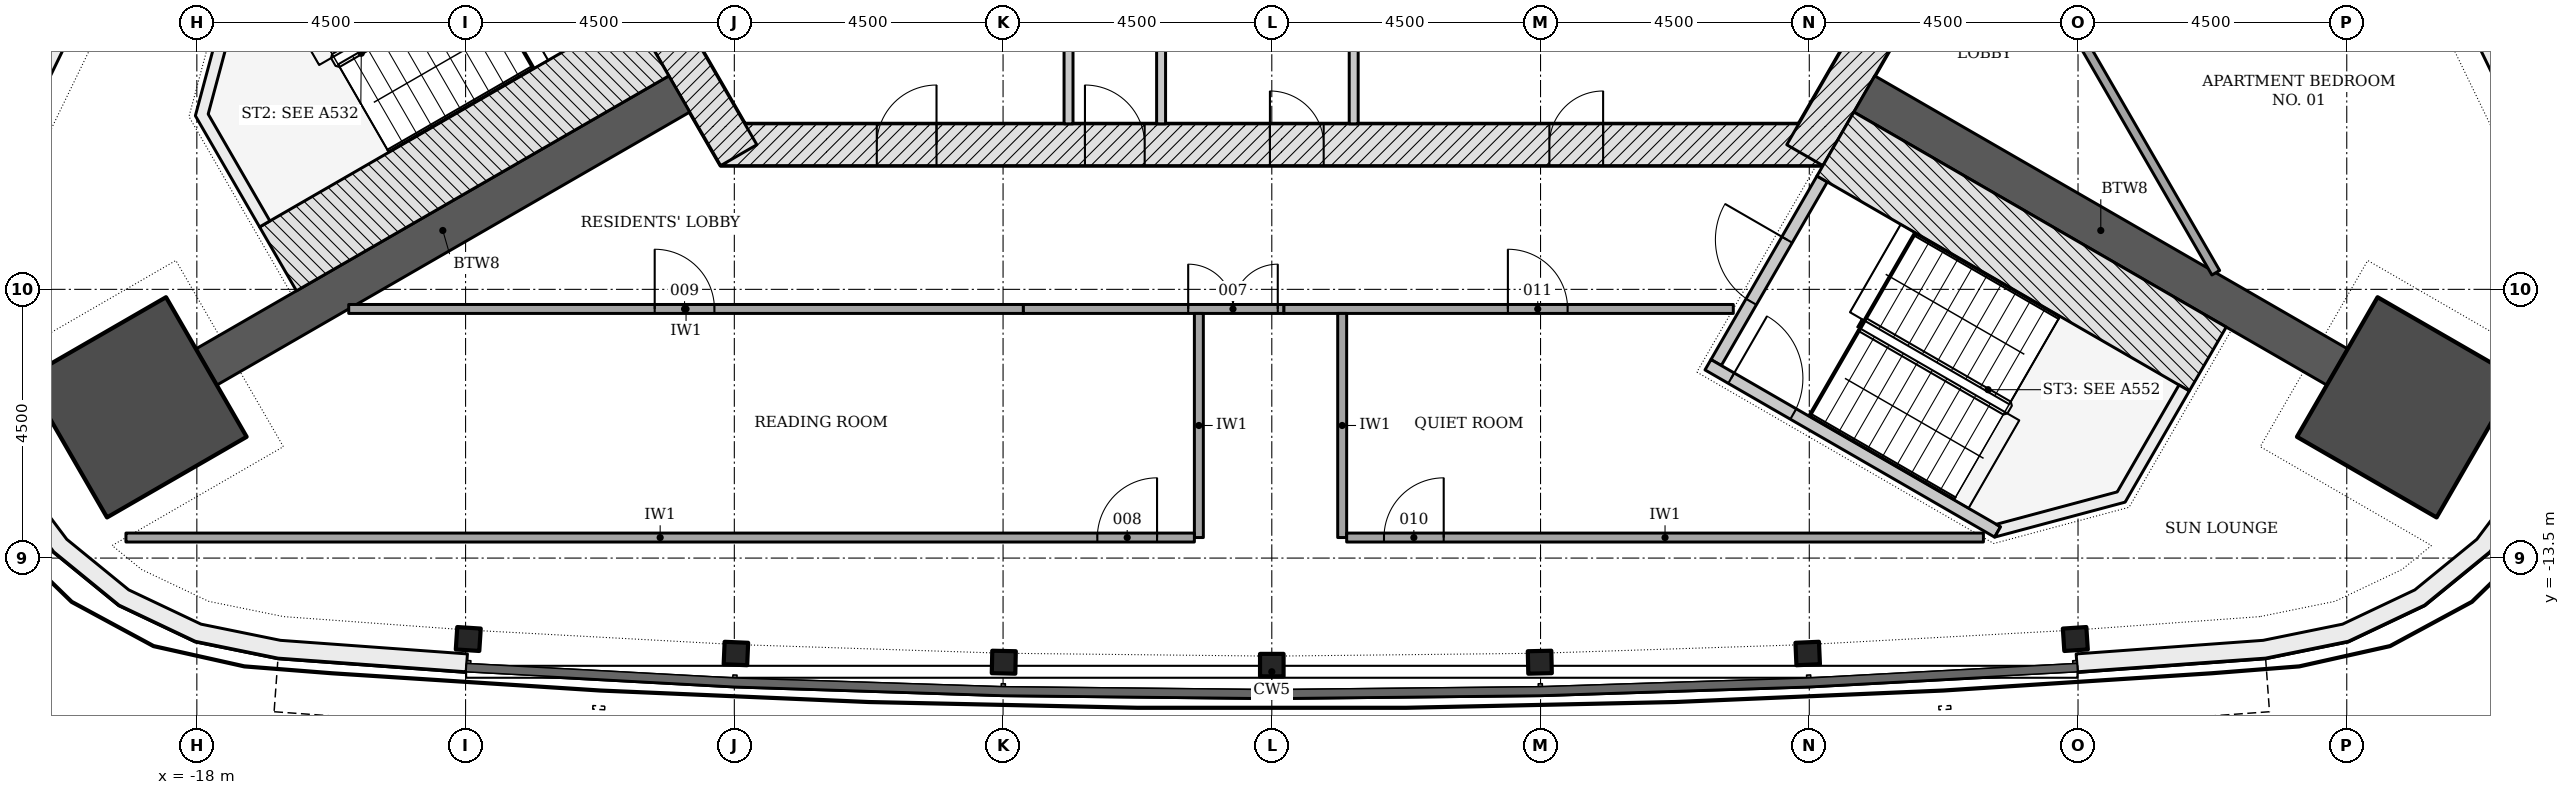
"""IFC4 building model, lengths in metres.
Left out: names, types, materials, properties, quantities, classifications, styles, units other than length and angle.
Written with IfcOpenShell. Run it as: python <this file> out.ifc"""

import sys

from ifc_helpers import new_model, si_unit, direction, frame, frame_2d, origin, origin_2d, place, context, subcontext, project, spatial, polyline, rectangle, i_section, outline, extrude, element, fill, save


model = new_model("IFC4")
c1 = context("Model", 3, precision=1e-05, world=origin(), true_north=direction((0.0, 1.0)))
c2 = subcontext(c1, "Body", "Model", "MODEL_VIEW")
j1 = project(units=[si_unit("LENGTHUNIT", "METRE"), si_unit("PLANEANGLEUNIT", "RADIAN")], contexts=[c1])
p1 = place(None, origin())
s1 = spatial("IfcSite", under=j1, at=p1, CompositionType="ELEMENT")
p2 = place(p1, origin())
s2 = spatial("IfcBuilding", under=s1, at=p2, CompositionType="ELEMENT")
p3 = place(p2, frame((0.0, 0.0, 192.3)))
s3 = spatial("IfcBuildingStorey", under=s2, at=p3, CompositionType="ELEMENT", Elevation=192.3)
p4 = place(p3, frame((-9.229, -6.578, -0.2), z_axis=(0.0, 0.0, 1.0), x_axis=(1.0, 0.0, 0.0)))
e1 = element("IfcWall", 1, at=p4, inside=s3, PredefinedType="SHEAR", context=c2, shape_type="SweptSolid", body=[
    extrude(rectangle(XDim=18.458, YDim=0.7, at=frame_2d((9.229, 0.0))), origin(), (0.0, 0.0, 1.0), 3.6),
])
p5 = place(p4, frame((6.1, 0.0, 0.2)))
e2 = element("IfcOpeningElement", 2, at=p5, cuts=e1, PredefinedType="OPENING", context=c2, shape_type="SweptSolid", body=[
    extrude(rectangle(XDim=1.0, YDim=2.1, at=frame_2d((0.5, 1.05))), frame((0.0, 0.36, 0.0), z_axis=(0.0, -1.0, 0.0), x_axis=(1.0, 0.0, 0.0)), (0.0, 0.0, 1.0), 0.72),
])
p6 = place(p4, frame((2.615, 0.0, 0.2)))
e3 = element("IfcOpeningElement", 3, at=p6, cuts=e1, PredefinedType="OPENING", context=c2, shape_type="SweptSolid", body=[
    extrude(rectangle(XDim=1.0, YDim=2.1, at=frame_2d((0.5, 1.05))), frame((0.0, 0.36, 0.0), z_axis=(0.0, -1.0, 0.0), x_axis=(1.0, 0.0, 0.0)), (0.0, 0.0, 1.0), 0.72),
])
p7 = place(p4, frame((9.198, 0.0, 0.2)))
e4 = element("IfcOpeningElement", 4, at=p7, cuts=e1, PredefinedType="OPENING", context=c2, shape_type="SweptSolid", body=[
    extrude(rectangle(XDim=0.9, YDim=2.1, at=frame_2d((0.45, 1.05))), frame((0.0, 0.36, 0.0), z_axis=(0.0, -1.0, 0.0), x_axis=(1.0, 0.0, 0.0)), (0.0, 0.0, 1.0), 0.72),
])
p8 = place(p4, frame((13.877, 0.0, 0.2)))
e5 = element("IfcOpeningElement", 5, at=p8, cuts=e1, PredefinedType="OPENING", context=c2, shape_type="SweptSolid", body=[
    extrude(rectangle(XDim=0.9, YDim=2.1, at=frame_2d((0.45, 1.05))), frame((0.0, 0.36, 0.0), z_axis=(0.0, -1.0, 0.0), x_axis=(1.0, 0.0, 0.0)), (0.0, 0.0, 1.0), 0.72),
])
for number, where, z_axis, x_axis in (
    (6, (8.926, -6.753, -0.2), (0.0, 0.0, 1.0), (0.5, 0.866, 0.0)),
    (7, (-10.311, -4.353, -0.2), (0.0, 0.0, 1.0), (0.5, -0.866, 0.0)),
):
    element("IfcWall", number, at=place(p3, frame(where, z_axis=z_axis, x_axis=x_axis)), inside=s3, PredefinedType="SHEAR", context=c2, shape_type="SweptSolid", body=[
        extrude(rectangle(XDim=2.771, YDim=0.7, at=frame_2d((1.386, 0.0))), origin(), (0.0, 0.0, 1.0), 3.6),
    ])
for number, where, z_axis, x_axis in (
    (8, (-9.922, -5.728, -0.2), (0.0, 0.0, 1.0), (-0.866, -0.5, 0.0)),
    (9, (9.922, -5.728, -0.2), (0.0, 0.0, 1.0), (0.866, -0.5, 0.0)),
):
    element("IfcWall", number, at=place(p3, frame(where, z_axis=z_axis, x_axis=x_axis)), inside=s3, PredefinedType="SHEAR", context=c2, shape_type="SweptSolid", body=[
        extrude(rectangle(XDim=9.145, YDim=0.7, at=frame_2d((4.572, 0.0))), origin(), (0.0, 0.0, 1.0), 3.6),
    ])
for number, where, z_axis, x_axis in (
    (10, (-19.01, -10.976, -0.2), (0.0, 0.0, 1.0), (-0.866, -0.5, 0.0)),
    (11, (19.01, -10.976, -0.2), (0.0, 0.0, 1.0), (0.866, -0.5, 0.0)),
):
    element("IfcColumn", number, at=place(p3, frame(where, z_axis=z_axis, x_axis=x_axis)), inside=s3, PredefinedType="COLUMN", context=c2, shape_type="SweptSolid", body=[
        extrude(rectangle(XDim=2.7, YDim=2.7, at=origin_2d()), origin(), (0.0, 0.0, 1.0), 3.6),
    ])
for number, where, z_axis, x_axis in (
    (12, (-13.455, -14.855, -0.2), (0.0, 0.0, 1.0), (0.998, -0.065, 0.0)),
    (13, (-8.973, -15.098, -0.2), (0.0, 0.0, 1.0), (0.999, -0.043, 0.0)),
    (14, (-4.488, -15.244, -0.2), (0.0, 0.0, 1.0), (1.0, -0.022, 0.0)),
    (15, (0.0, -15.292, -0.2), (0.0, 0.0, 1.0), (1.0, 0.0, 0.0)),
    (16, (4.488, -15.244, -0.2), (0.0, 0.0, 1.0), (1.0, 0.022, 0.0)),
    (17, (8.973, -15.098, -0.2), (0.0, 0.0, 1.0), (0.999, 0.043, 0.0)),
    (18, (13.455, -14.855, -0.2), (0.0, 0.0, 1.0), (0.998, 0.065, 0.0)),
):
    element("IfcColumn", number, at=place(p3, frame(where, z_axis=z_axis, x_axis=x_axis)), inside=s3, PredefinedType="COLUMN", context=c2, shape_type="SweptSolid", body=[
        extrude(i_section(OverallWidth=0.394, OverallDepth=0.376, WebThickness=0.017, FlangeThickness=0.028, FilletRadius=0.015, at=origin_2d()), origin(), (0.0, 0.0, 1.0), 3.6),
    ])
p9 = place(p3, origin())
e19 = element("IfcWall", 19, at=p9, inside=s3, PredefinedType="NOTDEFINED", context=c2, shape_type="SweptSolid", body=[
    extrude(outline(polyline([(-20.086, -3.981), (-21.463, -6.824), (-21.91, -8.164), (-22.025, -9.572), (-21.798, -10.966), (-21.245, -12.266), (-20.396, -13.395), (-19.302, -14.288), (-18.025, -14.893), (-16.641, -15.175), (-13.49, -15.404), (-13.469, -15.105), (-16.6, -14.877), (-17.929, -14.606), (-19.14, -14.032), (-20.178, -13.186), (-20.983, -12.115), (-21.508, -10.882), (-21.723, -9.56), (-21.615, -8.224), (-21.184, -6.937), (-19.816, -4.112), (-20.086, -3.981)])), origin(), (0.0, 0.0, 1.0), 3.3),
])
p10 = place(p3, origin())
e20 = element("IfcWall", 20, at=p10, inside=s3, PredefinedType="NOTDEFINED", context=c2, shape_type="SweptSolid", body=[
    extrude(outline(polyline([(13.49, -15.404), (16.641, -15.175), (18.025, -14.893), (19.302, -14.288), (20.396, -13.395), (21.245, -12.266), (21.798, -10.966), (22.025, -9.572), (21.91, -8.164), (21.463, -6.824), (20.086, -3.981), (19.816, -4.112), (21.184, -6.937), (21.615, -8.224), (21.723, -9.56), (21.508, -10.882), (20.983, -12.115), (20.178, -13.186), (19.14, -14.032), (17.929, -14.606), (16.6, -14.877), (13.469, -15.105), (13.49, -15.404)])), origin(), (0.0, 0.0, 1.0), 3.3),
])
p11 = place(p3, frame((-3.404, 0.131, 0.0), z_axis=(0.0, 0.0, 1.0), x_axis=(0.0, -1.0, 0.0)))
e21 = element("IfcWall", 21, at=p11, inside=s3, PredefinedType="PARTITIONING", context=c2, shape_type="SweptSolid", body=[
    extrude(rectangle(XDim=6.359, YDim=0.15, at=frame_2d((3.18, 0.0))), origin(), (0.0, 0.0, 1.0), 3.4),
])
p12 = place(p11, frame((1.281, 0.0, 0.0)))
e22 = element("IfcOpeningElement", 22, at=p12, cuts=e21, PredefinedType="OPENING", context=c2, shape_type="SweptSolid", body=[
    extrude(rectangle(XDim=0.9, YDim=2.1, at=frame_2d((0.45, 1.05))), frame((0.0, 0.085, 0.0), z_axis=(0.0, -1.0, 0.0), x_axis=(1.0, 0.0, 0.0)), (0.0, 0.0, 1.0), 0.17),
])
p13 = place(p3, frame((-1.854, 5.497, 0.0), z_axis=(0.0, 0.0, 1.0), x_axis=(0.0, -1.0, 0.0)))
e23 = element("IfcWall", 23, at=p13, inside=s3, PredefinedType="PARTITIONING", context=c2, shape_type="SweptSolid", body=[
    extrude(rectangle(XDim=11.725, YDim=0.15, at=frame_2d((5.863, 0.0))), origin(), (0.0, 0.0, 1.0), 3.4),
])
p14 = place(p13, frame((5.775, 0.0, 0.0)))
e24 = element("IfcOpeningElement", 24, at=p14, cuts=e23, PredefinedType="OPENING", context=c2, shape_type="SweptSolid", body=[
    extrude(rectangle(XDim=0.9, YDim=2.1, at=frame_2d((0.45, 1.05))), frame((0.0, 0.085, 0.0), z_axis=(0.0, -1.0, 0.0), x_axis=(1.0, 0.0, 0.0)), (0.0, 0.0, 1.0), 0.17),
])
p15 = place(p13, frame((1.364, 0.0, 0.0)))
e25 = element("IfcOpeningElement", 25, at=p15, cuts=e23, PredefinedType="OPENING", context=c2, shape_type="SweptSolid", body=[
    extrude(rectangle(XDim=0.9, YDim=2.1, at=frame_2d((0.45, 1.05))), frame((0.0, 0.085, 0.0), z_axis=(0.0, -1.0, 0.0), x_axis=(1.0, 0.0, 0.0)), (0.0, 0.0, 1.0), 0.17),
])
p16 = place(p3, frame((1.371, -3.403, 0.0), z_axis=(0.0, 0.0, 1.0), x_axis=(0.0, -1.0, 0.0)))
e26 = element("IfcWall", 26, at=p16, inside=s3, PredefinedType="PARTITIONING", context=c2, shape_type="SweptSolid", body=[
    extrude(rectangle(XDim=2.825, YDim=0.15, at=frame_2d((1.413, 0.0))), origin(), (0.0, 0.0, 1.0), 3.4),
])
p17 = place(p3, frame((-10.406, -4.89, -0.2), z_axis=(0.0, 0.0, 1.0), x_axis=(-0.866018442252, -0.500012057535, 0.0)))
e27 = element("IfcWall", 27, at=p17, inside=s3, PredefinedType="SHEAR", context=c2, shape_type="SweptSolid", body=[
    extrude(rectangle(XDim=7.2, YDim=1.236, at=frame_2d((3.6, 0.0))), origin(), (0.0, 0.0, 1.0), 3.6),
])
p18 = place(p3, frame((0.0, 0.0, -0.2)))
e28 = element("IfcWall", 28, at=p18, inside=s3, PredefinedType="SHEAR", context=c2, shape_type="SweptSolid", body=[
    extrude(outline(polyline([(-17.439, -3.907), (-18.025, -6.093), (-16.95, -7.955), (-16.777, -7.855), (-17.81, -6.065), (-17.267, -4.039), (-17.339, -4.081), (-17.339, -4.081), (-17.339, -4.081), (-17.339, -4.081), (-17.339, -4.081), (-17.339, -4.081), (-17.339, -4.081), (-17.339, -4.081), (-17.339, -4.081), (-17.339, -4.081), (-17.339, -4.081), (-17.339, -4.081), (-17.339, -4.081), (-17.339, -4.081), (-17.339, -4.081), (-17.339, -4.081), (-17.339, -4.081), (-17.439, -3.907)])), origin(), (0.0, 0.0, 1.0), 3.6),
])
p19 = place(p3, frame((7.44, -10.226, -0.2), z_axis=(0.0, 0.0, 1.0), x_axis=(0.500022077904, 0.866012656725, 0.0)))
e29 = element("IfcWall", 29, at=p19, inside=s3, PredefinedType="SHEAR", context=c2, shape_type="SweptSolid", body=[
    extrude(rectangle(XDim=3.55, YDim=0.2, at=frame_2d((1.775, 0.0))), origin(), (0.0, 0.0, 1.0), 3.6),
])
p20 = place(p19, frame((1.175, 0.0, 0.2)))
e30 = element("IfcOpeningElement", 30, at=p20, cuts=e29, PredefinedType="OPENING", context=c2, shape_type="SweptSolid", body=[
    extrude(rectangle(XDim=1.2, YDim=2.1, at=frame_2d((0.6, 1.05))), frame((0.0, 0.11, 0.0), z_axis=(0.0, -1.0, 0.0), x_axis=(1.0, 0.0, 0.0)), (0.0, 0.0, 1.0), 0.22),
])
p21 = place(p3, frame((7.304, -10.262, -0.2), z_axis=(0.0, 0.0, 1.0), x_axis=(0.866026594901, -0.49999793692, 0.0)))
e31 = element("IfcWall", 31, at=p21, inside=s3, PredefinedType="SHEAR", context=c2, shape_type="SweptSolid", body=[
    extrude(rectangle(XDim=5.6, YDim=0.2, at=frame_2d((2.8, 0.0))), origin(), (0.0, 0.0, 1.0), 3.6),
])
p22 = place(p21, frame((0.45, 0.0, 0.2)))
e32 = element("IfcOpeningElement", 32, at=p22, cuts=e31, PredefinedType="OPENING", context=c2, shape_type="SweptSolid", body=[
    extrude(rectangle(XDim=1.2, YDim=2.1, at=frame_2d((0.6, 1.05))), frame((0.0, 0.11, 0.0), z_axis=(0.0, -1.0, 0.0), x_axis=(1.0, 0.0, 0.0)), (0.0, 0.0, 1.0), 0.22),
])
p23 = place(p3, frame((9.438, -6.566, -0.2), z_axis=(0.0, 0.0, 1.0), x_axis=(0.866026919366, -0.499997374926, 0.0)))
e33 = element("IfcWall", 33, at=p23, inside=s3, PredefinedType="SHEAR", context=c2, shape_type="SweptSolid", body=[
    extrude(rectangle(XDim=7.2, YDim=1.236, at=frame_2d((3.6, 0.0))), origin(), (0.0, 0.0, 1.0), 3.6),
])
p24 = place(p3, frame((0.0, 0.0, -0.2)))
e34 = element("IfcWall", 34, at=p24, inside=s3, PredefinedType="SHEAR", context=c2, shape_type="SweptSolid", body=[
    extrude(outline(polyline([(12.104, -13.149), (14.289, -12.563), (15.364, -10.701), (15.191, -10.601), (14.157, -12.392), (12.132, -12.934), (12.204, -12.976), (12.204, -12.976), (12.204, -12.976), (12.204, -12.976), (12.204, -12.976), (12.204, -12.976), (12.204, -12.976), (12.204, -12.976), (12.204, -12.976), (12.204, -12.976), (12.204, -12.976), (12.204, -12.976), (12.204, -12.976), (12.204, -12.976), (12.204, -12.976), (12.204, -12.976), (12.204, -12.976), (12.104, -13.149)])), origin(), (0.0, 0.0, 1.0), 3.6),
])
p25 = place(p3, frame((15.807, -8.722, 0.0), z_axis=(0.0, 0.0, 1.0), x_axis=(-0.500004300164, 0.866022921069, 0.0)))
e35 = element("IfcWall", 35, at=p25, inside=s3, PredefinedType="PARTITIONING", context=c2, shape_type="SweptSolid", body=[
    extrude(rectangle(XDim=11.297, YDim=0.15, at=frame_2d((5.649, 0.0))), origin(), (0.0, 0.0, 1.0), 2.852),
])
p26 = place(p3, frame((-15.457, -9.328, 0.0), z_axis=(0.0, 0.0, 1.0), x_axis=(1.0, 0.0, 0.0)))
e36 = element("IfcWall", 36, at=p26, inside=s3, PredefinedType="PARTITIONING", context=c2, shape_type="SweptSolid", body=[
    extrude(rectangle(XDim=11.297, YDim=0.15, at=frame_2d((5.649, 0.0))), origin(), (0.0, 0.0, 1.0), 2.852),
])
p27 = place(p26, frame((5.124, 0.0, 0.0)))
e37 = element("IfcOpeningElement", 37, at=p27, cuts=e36, PredefinedType="OPENING", context=c2, shape_type="SweptSolid", body=[
    extrude(rectangle(XDim=1.0, YDim=2.1, at=frame_2d((0.5, 1.05))), frame((0.0, 0.085, 0.0), z_axis=(0.0, -1.0, 0.0), x_axis=(1.0, 0.0, 0.0)), (0.0, 0.0, 1.0), 0.17),
])
p28 = place(p3, frame((0.2, -9.328, 0.0), z_axis=(0.0, 0.0, 1.0), x_axis=(1.0, 0.0, 0.0)))
e38 = element("IfcWall", 38, at=p28, inside=s3, PredefinedType="PARTITIONING", context=c2, shape_type="SweptSolid", body=[
    extrude(rectangle(XDim=7.528, YDim=0.15, at=frame_2d((3.764, 0.0))), origin(), (0.0, 0.0, 1.0), 2.852),
])
p29 = place(p28, frame((3.753, 0.0, 0.0)))
e39 = element("IfcOpeningElement", 39, at=p29, cuts=e38, PredefinedType="OPENING", context=c2, shape_type="SweptSolid", body=[
    extrude(rectangle(XDim=1.0, YDim=2.1, at=frame_2d((0.5, 1.05))), frame((0.0, 0.085, 0.0), z_axis=(0.0, -1.0, 0.0), x_axis=(1.0, 0.0, 0.0)), (0.0, 0.0, 1.0), 0.17),
])
p30 = place(p3, frame((-4.16, -9.328, 0.0), z_axis=(0.0, 0.0, 1.0), x_axis=(1.0, 0.0, 0.0)))
e40 = element("IfcWall", 40, at=p30, inside=s3, PredefinedType="PARTITIONING", context=c2, shape_type="SweptSolid", body=[
    extrude(rectangle(XDim=4.36, YDim=0.15, at=frame_2d((2.18, 0.0))), origin(), (0.0, 0.0, 1.0), 2.852),
])
p31 = place(p30, frame((2.76, 0.0, 0.0)))
e41 = element("IfcOpeningElement", 41, at=p31, cuts=e40, PredefinedType="OPENING", context=c2, shape_type="SweptSolid", body=[
    extrude(rectangle(XDim=1.5, YDim=2.1, at=frame_2d((0.75, 1.05))), frame((0.0, 0.085, 0.0), z_axis=(0.0, -1.0, 0.0), x_axis=(1.0, 0.0, 0.0)), (0.0, 0.0, 1.0), 0.17),
])
for number, where, z_axis, x_axis in (
    (42, (-1.221, -9.403, 0.0), (0.0, 0.0, 1.0), (0.0, -1.0, 0.0)),
    (43, (1.179, -9.403, 0.0), (0.0, 0.0, 1.0), (0.0, -1.0, 0.0)),
):
    element("IfcWall", number, at=place(p3, frame(where, z_axis=z_axis, x_axis=x_axis)), inside=s3, PredefinedType="PARTITIONING", context=c2, shape_type="SweptSolid", body=[
        extrude(rectangle(XDim=3.753, YDim=0.15, at=frame_2d((1.876, 0.0))), origin(), (0.0, 0.0, 1.0), 3.4),
    ])
p32 = place(p3, frame((-19.187, -13.156, 0.0), z_axis=(0.0, 0.0, 1.0), x_axis=(1.0, 0.0, 0.0)))
e44 = element("IfcWall", 44, at=p32, inside=s3, PredefinedType="PARTITIONING", context=c2, shape_type="SweptSolid", body=[
    extrude(rectangle(XDim=17.891, YDim=0.15, at=frame_2d((8.945, 0.0))), origin(), (0.0, 0.0, 1.0), 2.852),
])
p33 = place(p32, frame((16.266, 0.0, 0.0)))
e45 = element("IfcOpeningElement", 45, at=p33, cuts=e44, PredefinedType="OPENING", context=c2, shape_type="SweptSolid", body=[
    extrude(rectangle(XDim=1.0, YDim=2.1, at=frame_2d((0.5, 1.05))), frame((0.0, 0.085, 0.0), z_axis=(0.0, -1.0, 0.0), x_axis=(1.0, 0.0, 0.0)), (0.0, 0.0, 1.0), 0.17),
])
p34 = place(p3, frame((1.254, -13.156, 0.0), z_axis=(0.0, 0.0, 1.0), x_axis=(1.0, 0.0, 0.0)))
e46 = element("IfcWall", 46, at=p34, inside=s3, PredefinedType="PARTITIONING", context=c2, shape_type="SweptSolid", body=[
    extrude(rectangle(XDim=10.662, YDim=0.15, at=frame_2d((5.331, 0.0))), origin(), (0.0, 0.0, 1.0), 2.852),
])
p35 = place(p34, frame((0.625, 0.0, 0.0)))
e47 = element("IfcOpeningElement", 47, at=p35, cuts=e46, PredefinedType="OPENING", context=c2, shape_type="SweptSolid", body=[
    extrude(rectangle(XDim=1.0, YDim=2.1, at=frame_2d((0.5, 1.05))), frame((0.0, 0.085, 0.0), z_axis=(0.0, -1.0, 0.0), x_axis=(1.0, 0.0, 0.0)), (0.0, 0.0, 1.0), 0.17),
])
p36 = place(p5, origin())
e48 = element("IfcDoor", 48, at=p36, inside=s3, OperationType="SINGLE_SWING_LEFT", PredefinedType="DOOR", context=c2, shape_type="SweptSolid", body=[
    extrude(rectangle(XDim=1.0, YDim=2.1, at=frame_2d((0.5, 1.05))), frame((0.0, 0.075, 0.0), z_axis=(0.0, -1.0, 0.0), x_axis=(1.0, 0.0, 0.0)), (0.0, 0.0, 1.0), 0.15),
])
fill(e2, e48)
p37 = place(p6, origin())
e49 = element("IfcDoor", 49, at=p37, inside=s3, OperationType="SINGLE_SWING_RIGHT", PredefinedType="DOOR", context=c2, shape_type="SweptSolid", body=[
    extrude(rectangle(XDim=1.0, YDim=2.1, at=frame_2d((0.5, 1.05))), frame((0.0, 0.075, 0.0), z_axis=(0.0, -1.0, 0.0), x_axis=(1.0, 0.0, 0.0)), (0.0, 0.0, 1.0), 0.15),
])
fill(e3, e49)
p38 = place(p7, origin())
e50 = element("IfcDoor", 50, at=p38, inside=s3, OperationType="SINGLE_SWING_LEFT", PredefinedType="DOOR", context=c2, shape_type="SweptSolid", body=[
    extrude(rectangle(XDim=0.9, YDim=2.1, at=frame_2d((0.45, 1.05))), frame((0.0, 0.075, 0.0), z_axis=(0.0, -1.0, 0.0), x_axis=(1.0, 0.0, 0.0)), (0.0, 0.0, 1.0), 0.15),
])
fill(e4, e50)
p39 = place(p8, origin())
e51 = element("IfcDoor", 51, at=p39, inside=s3, OperationType="SINGLE_SWING_RIGHT", PredefinedType="DOOR", context=c2, shape_type="SweptSolid", body=[
    extrude(rectangle(XDim=0.9, YDim=2.1, at=frame_2d((0.45, 1.05))), frame((0.0, 0.075, 0.0), z_axis=(0.0, -1.0, 0.0), x_axis=(1.0, 0.0, 0.0)), (0.0, 0.0, 1.0), 0.15),
])
fill(e5, e51)
p40 = place(p20, origin())
e52 = element("IfcDoor", 52, at=p40, inside=s3, OperationType="SINGLE_SWING_RIGHT", PredefinedType="DOOR", context=c2, shape_type="SweptSolid", body=[
    extrude(rectangle(XDim=1.2, YDim=2.1, at=frame_2d((0.6, 1.05))), frame((0.0, 0.025, 0.0), z_axis=(0.0, -1.0, 0.0), x_axis=(1.0, 0.0, 0.0)), (0.0, 0.0, 1.0), 0.05),
])
fill(e30, e52)
p41 = place(p22, origin())
e53 = element("IfcDoor", 53, at=p41, inside=s3, OperationType="SINGLE_SWING_LEFT", PredefinedType="DOOR", context=c2, shape_type="SweptSolid", body=[
    extrude(rectangle(XDim=1.2, YDim=2.1, at=frame_2d((0.6, 1.05))), frame((0.0, 0.025, 0.0), z_axis=(0.0, -1.0, 0.0), x_axis=(1.0, 0.0, 0.0)), (0.0, 0.0, 1.0), 0.05),
])
fill(e32, e53)
p42 = place(p31, origin())
e54 = element("IfcDoor", 54, at=p42, inside=s3, OperationType="DOUBLE_DOOR_SINGLE_SWING", PredefinedType="DOOR", context=c2, shape_type="SweptSolid", body=[
    extrude(rectangle(XDim=1.5, YDim=2.1, at=frame_2d((0.75, 1.05))), frame((0.0, 0.025, 0.0), z_axis=(0.0, -1.0, 0.0), x_axis=(1.0, 0.0, 0.0)), (0.0, 0.0, 1.0), 0.05),
])
fill(e41, e54)
p43 = place(p33, origin())
e55 = element("IfcDoor", 55, at=p43, inside=s3, OperationType="SINGLE_SWING_RIGHT", PredefinedType="DOOR", context=c2, shape_type="SweptSolid", body=[
    extrude(rectangle(XDim=1.0, YDim=2.1, at=frame_2d((0.5, 1.05))), frame((0.0, 0.025, 0.0), z_axis=(0.0, -1.0, 0.0), x_axis=(1.0, 0.0, 0.0)), (0.0, 0.0, 1.0), 0.05),
])
fill(e45, e55)
p44 = place(p27, origin())
e56 = element("IfcDoor", 56, at=p44, inside=s3, OperationType="SINGLE_SWING_LEFT", PredefinedType="DOOR", context=c2, shape_type="SweptSolid", body=[
    extrude(rectangle(XDim=1.0, YDim=2.1, at=frame_2d((0.5, 1.05))), frame((0.0, 0.025, 0.0), z_axis=(0.0, -1.0, 0.0), x_axis=(1.0, 0.0, 0.0)), (0.0, 0.0, 1.0), 0.05),
])
fill(e37, e56)
p45 = place(p35, origin())
e57 = element("IfcDoor", 57, at=p45, inside=s3, OperationType="SINGLE_SWING_RIGHT", PredefinedType="DOOR", context=c2, shape_type="SweptSolid", body=[
    extrude(rectangle(XDim=1.0, YDim=2.1, at=frame_2d((0.5, 1.05))), frame((0.0, 0.025, 0.0), z_axis=(0.0, -1.0, 0.0), x_axis=(1.0, 0.0, 0.0)), (0.0, 0.0, 1.0), 0.05),
])
fill(e47, e57)
p46 = place(p29, origin())
e58 = element("IfcDoor", 58, at=p46, inside=s3, OperationType="SINGLE_SWING_LEFT", PredefinedType="DOOR", context=c2, shape_type="SweptSolid", body=[
    extrude(rectangle(XDim=1.0, YDim=2.1, at=frame_2d((0.5, 1.05))), frame((0.0, 0.025, 0.0), z_axis=(0.0, -1.0, 0.0), x_axis=(1.0, 0.0, 0.0)), (0.0, 0.0, 1.0), 0.05),
])
fill(e39, e58)
save(model, sys.argv[1])
